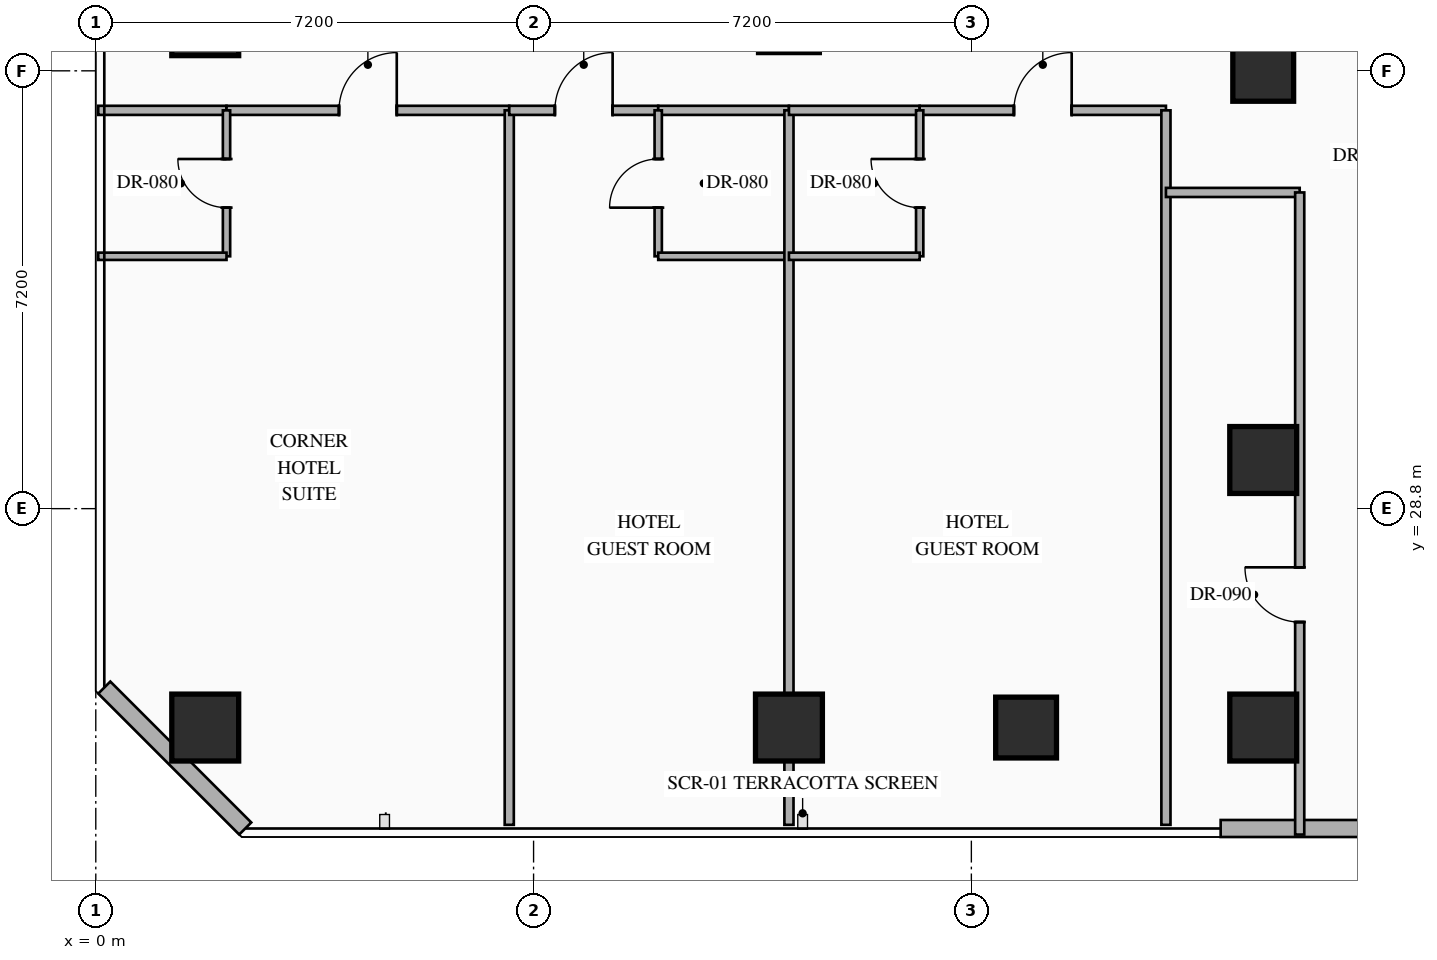
"""IFC4 building model, lengths in metres.
Left out: names, types, materials, properties, quantities, classifications, styles, units other than length and angle.
Written with IfcOpenShell. Run it as: python <this file> out.ifc"""

import sys

from ifc_helpers import new_model, si_unit, direction, frame, frame_2d, origin, origin_2d, place, context, subcontext, project, spatial, rectangle, hollow_rectangle, extrude, element, fill, save


model = new_model("IFC4")
c1 = context("Model", 3, precision=1e-05, world=origin(), true_north=direction((0.0, 1.0)))
c2 = subcontext(c1, "Body", "Model", "MODEL_VIEW")
j1 = project(units=[si_unit("LENGTHUNIT", "METRE"), si_unit("PLANEANGLEUNIT", "RADIAN")], contexts=[c1])
p1 = place(None, origin())
s1 = spatial("IfcSite", under=j1, at=p1, CompositionType="ELEMENT")
p2 = place(p1, origin())
s2 = spatial("IfcBuilding", under=s1, at=p2, CompositionType="ELEMENT")
p3 = place(p2, frame((0.0, 0.0, 46.65)))
s3 = spatial("IfcBuildingStorey", under=s2, at=p3, CompositionType="ELEMENT", Elevation=46.65)
for number, where, z_axis, x_axis in (
    (1, (1.8, 25.2, 0.0), (0.0, 0.0, 1.0), (1.0, 0.0, 0.0)),
    (2, (1.8, 36.8, 0.0), (0.0, 0.0, 1.0), (1.0, 0.0, 0.0)),
    (3, (11.4, 25.2, 0.0), (0.0, 0.0, 1.0), (1.0, 0.0, 0.0)),
    (4, (19.2, 25.2, 0.0), (0.0, 0.0, 1.0), (1.0, 0.0, 0.0)),
    (5, (19.2, 29.6, 0.0), (0.0, 0.0, 1.0), (1.0, 0.0, 0.0)),
):
    element("IfcColumn", number, at=place(p3, frame(where, z_axis=z_axis, x_axis=x_axis)), inside=s3, PredefinedType="COLUMN", context=c2, shape_type="SweptSolid", body=[
        extrude(hollow_rectangle(XDim=1.1, YDim=1.1, WallThickness=0.04, at=origin_2d()), origin(), (0.0, 0.0, 1.0), 3.35),
    ])
for number, where, z_axis, x_axis in (
    (6, (19.2, 36.0, 0.0), (0.0, 0.0, 1.0), (1.0, 0.0, 0.0)),
    (7, (15.3, 25.2, 0.0), (0.0, 0.0, 1.0), (1.0, 0.0, 0.0)),
):
    element("IfcColumn", number, at=place(p3, frame(where, z_axis=z_axis, x_axis=x_axis)), inside=s3, PredefinedType="COLUMN", context=c2, shape_type="SweptSolid", body=[
        extrude(hollow_rectangle(XDim=1.0, YDim=1.0, WallThickness=0.038, at=origin_2d()), origin(), (0.0, 0.0, 1.0), 3.35),
    ])
p4 = place(p3, frame((25.247, 23.54, 0.0), z_axis=(0.0, 0.0, 1.0), x_axis=(-1.0, 0.0, 0.0)))
e8 = element("IfcWall", 8, at=p4, inside=s3, PredefinedType="STANDARD", context=c2, shape_type="SweptSolid", body=[
    extrude(rectangle(XDim=6.747, YDim=0.28, at=frame_2d((3.374, 0.0))), origin(), (0.0, 0.0, 1.0), 3.13),
])
p5 = place(p3, frame((2.458, 23.54, 0.0), z_axis=(0.0, 0.0, 1.0), x_axis=(-0.707144017911, 0.707069542501, 0.0)))
e9 = element("IfcWall", 9, at=p5, inside=s3, PredefinedType="STANDARD", context=c2, shape_type="SweptSolid", body=[
    extrude(rectangle(XDim=3.278, YDim=0.28, at=frame_2d((1.639, 0.0))), origin(), (0.0, 0.0, 1.0), 3.13),
])
p6 = place(p3, frame((0.04, 35.35, 0.0), z_axis=(0.0, 0.0, 1.0), x_axis=(1.0, 0.0, 0.0)))
e10 = element("IfcWall", 10, at=p6, inside=s3, PredefinedType="PARTITIONING", context=c2, shape_type="SweptSolid", body=[
    extrude(rectangle(XDim=2.11, YDim=0.15, at=frame_2d((1.055, 0.0))), origin(), (0.0, 0.0, 1.0), 3.13),
])
p7 = place(p3, frame((2.15, 35.35, 0.0), z_axis=(0.0, 0.0, 1.0), x_axis=(1.0, 0.0, 0.0)))
e11 = element("IfcWall", 11, at=p7, inside=s3, PredefinedType="PARTITIONING", context=c2, shape_type="SweptSolid", body=[
    extrude(rectangle(XDim=4.65, YDim=0.15, at=frame_2d((2.325, 0.0))), origin(), (0.0, 0.0, 1.0), 3.13),
])
p8 = place(p7, frame((1.85, 0.0, 0.0)))
e12 = element("IfcOpeningElement", 12, at=p8, cuts=e11, PredefinedType="OPENING", context=c2, shape_type="SweptSolid", body=[
    extrude(rectangle(XDim=0.95, YDim=2.15, at=frame_2d((0.475, 1.075))), frame((0.0, 0.085, 0.0), z_axis=(0.0, -1.0, 0.0), x_axis=(1.0, 0.0, 0.0)), (0.0, 0.0, 1.0), 0.17),
])
p9 = place(p3, frame((2.15, 32.95, 0.0), z_axis=(0.0, 0.0, 1.0), x_axis=(0.0, 1.0, 0.0)))
e13 = element("IfcWall", 13, at=p9, inside=s3, PredefinedType="PARTITIONING", context=c2, shape_type="SweptSolid", body=[
    extrude(rectangle(XDim=2.4, YDim=0.12, at=frame_2d((1.2, 0.0))), origin(), (0.0, 0.0, 1.0), 3.13),
])
p10 = place(p9, frame((0.8, 0.0, 0.0)))
e14 = element("IfcOpeningElement", 14, at=p10, cuts=e13, PredefinedType="OPENING", context=c2, shape_type="SweptSolid", body=[
    extrude(rectangle(XDim=0.8, YDim=2.06, at=frame_2d((0.4, 1.03))), frame((0.0, 0.07, 0.0), z_axis=(0.0, -1.0, 0.0), x_axis=(1.0, 0.0, 0.0)), (0.0, 0.0, 1.0), 0.14),
])
p11 = place(p3, frame((0.04, 32.95, 0.0), z_axis=(0.0, 0.0, 1.0), x_axis=(1.0, 0.0, 0.0)))
e15 = element("IfcWall", 15, at=p11, inside=s3, PredefinedType="PARTITIONING", context=c2, shape_type="SweptSolid", body=[
    extrude(rectangle(XDim=2.11, YDim=0.12, at=frame_2d((1.055, 0.0))), origin(), (0.0, 0.0, 1.0), 3.13),
])
p12 = place(p3, frame((6.8, 23.6, 0.0), z_axis=(0.0, 0.0, 1.0), x_axis=(0.0, 1.0, 0.0)))
e16 = element("IfcWall", 16, at=p12, inside=s3, PredefinedType="PARTITIONING", context=c2, shape_type="SweptSolid", body=[
    extrude(rectangle(XDim=11.75, YDim=0.15, at=frame_2d((5.875, 0.0))), origin(), (0.0, 0.0, 1.0), 3.13),
])
p13 = place(p3, frame((6.8, 35.35, 0.0), z_axis=(0.0, 0.0, 1.0), x_axis=(1.0, 0.0, 0.0)))
e17 = element("IfcWall", 17, at=p13, inside=s3, PredefinedType="PARTITIONING", context=c2, shape_type="SweptSolid", body=[
    extrude(rectangle(XDim=2.45, YDim=0.15, at=frame_2d((1.225, 0.0))), origin(), (0.0, 0.0, 1.0), 3.13),
])
p14 = place(p13, frame((0.75, 0.0, 0.0)))
e18 = element("IfcOpeningElement", 18, at=p14, cuts=e17, PredefinedType="OPENING", context=c2, shape_type="SweptSolid", body=[
    extrude(rectangle(XDim=0.95, YDim=2.15, at=frame_2d((0.475, 1.075))), frame((0.0, 0.085, 0.0), z_axis=(0.0, -1.0, 0.0), x_axis=(1.0, 0.0, 0.0)), (0.0, 0.0, 1.0), 0.17),
])
p15 = place(p3, frame((9.25, 35.35, 0.0), z_axis=(0.0, 0.0, 1.0), x_axis=(1.0, 0.0, 0.0)))
e19 = element("IfcWall", 19, at=p15, inside=s3, PredefinedType="PARTITIONING", context=c2, shape_type="SweptSolid", body=[
    extrude(rectangle(XDim=2.15, YDim=0.15, at=frame_2d((1.075, 0.0))), origin(), (0.0, 0.0, 1.0), 3.13),
])
p16 = place(p3, frame((9.25, 32.95, 0.0), z_axis=(0.0, 0.0, 1.0), x_axis=(0.0, 1.0, 0.0)))
e20 = element("IfcWall", 20, at=p16, inside=s3, PredefinedType="PARTITIONING", context=c2, shape_type="SweptSolid", body=[
    extrude(rectangle(XDim=2.4, YDim=0.12, at=frame_2d((1.2, 0.0))), origin(), (0.0, 0.0, 1.0), 3.13),
])
p17 = place(p16, frame((0.8, 0.0, 0.0)))
e21 = element("IfcOpeningElement", 21, at=p17, cuts=e20, PredefinedType="OPENING", context=c2, shape_type="SweptSolid", body=[
    extrude(rectangle(XDim=0.8, YDim=2.06, at=frame_2d((0.4, 1.03))), frame((0.0, 0.07, 0.0), z_axis=(0.0, -1.0, 0.0), x_axis=(1.0, 0.0, 0.0)), (0.0, 0.0, 1.0), 0.14),
])
p18 = place(p3, frame((9.25, 32.95, 0.0), z_axis=(0.0, 0.0, 1.0), x_axis=(1.0, 0.0, 0.0)))
e22 = element("IfcWall", 22, at=p18, inside=s3, PredefinedType="PARTITIONING", context=c2, shape_type="SweptSolid", body=[
    extrude(rectangle(XDim=2.15, YDim=0.12, at=frame_2d((1.075, 0.0))), origin(), (0.0, 0.0, 1.0), 3.13),
])
p19 = place(p3, frame((11.4, 23.6, 0.0), z_axis=(0.0, 0.0, 1.0), x_axis=(0.0, 1.0, 0.0)))
e23 = element("IfcWall", 23, at=p19, inside=s3, PredefinedType="PARTITIONING", context=c2, shape_type="SweptSolid", body=[
    extrude(rectangle(XDim=11.75, YDim=0.15, at=frame_2d((5.875, 0.0))), origin(), (0.0, 0.0, 1.0), 2.425),
])
p20 = place(p3, frame((11.4, 35.35, 0.0), z_axis=(0.0, 0.0, 1.0), x_axis=(1.0, 0.0, 0.0)))
e24 = element("IfcWall", 24, at=p20, inside=s3, PredefinedType="PARTITIONING", context=c2, shape_type="SweptSolid", body=[
    extrude(rectangle(XDim=2.15, YDim=0.15, at=frame_2d((1.075, 0.0))), origin(), (0.0, 0.0, 1.0), 3.13),
])
p21 = place(p3, frame((13.55, 35.35, 0.0), z_axis=(0.0, 0.0, 1.0), x_axis=(1.0, 0.0, 0.0)))
e25 = element("IfcWall", 25, at=p21, inside=s3, PredefinedType="PARTITIONING", context=c2, shape_type="SweptSolid", body=[
    extrude(rectangle(XDim=4.05, YDim=0.15, at=frame_2d((2.025, 0.0))), origin(), (0.0, 0.0, 1.0), 3.13),
])
p22 = place(p21, frame((1.55, 0.0, 0.0)))
e26 = element("IfcOpeningElement", 26, at=p22, cuts=e25, PredefinedType="OPENING", context=c2, shape_type="SweptSolid", body=[
    extrude(rectangle(XDim=0.95, YDim=2.15, at=frame_2d((0.475, 1.075))), frame((0.0, 0.085, 0.0), z_axis=(0.0, -1.0, 0.0), x_axis=(1.0, 0.0, 0.0)), (0.0, 0.0, 1.0), 0.17),
])
p23 = place(p3, frame((13.55, 32.95, 0.0), z_axis=(0.0, 0.0, 1.0), x_axis=(0.0, 1.0, 0.0)))
e27 = element("IfcWall", 27, at=p23, inside=s3, PredefinedType="PARTITIONING", context=c2, shape_type="SweptSolid", body=[
    extrude(rectangle(XDim=2.4, YDim=0.12, at=frame_2d((1.2, 0.0))), origin(), (0.0, 0.0, 1.0), 3.13),
])
p24 = place(p23, frame((0.8, 0.0, 0.0)))
e28 = element("IfcOpeningElement", 28, at=p24, cuts=e27, PredefinedType="OPENING", context=c2, shape_type="SweptSolid", body=[
    extrude(rectangle(XDim=0.8, YDim=2.06, at=frame_2d((0.4, 1.03))), frame((0.0, 0.07, 0.0), z_axis=(0.0, -1.0, 0.0), x_axis=(1.0, 0.0, 0.0)), (0.0, 0.0, 1.0), 0.14),
])
p25 = place(p3, frame((11.4, 32.95, 0.0), z_axis=(0.0, 0.0, 1.0), x_axis=(1.0, 0.0, 0.0)))
e29 = element("IfcWall", 29, at=p25, inside=s3, PredefinedType="PARTITIONING", context=c2, shape_type="SweptSolid", body=[
    extrude(rectangle(XDim=2.15, YDim=0.12, at=frame_2d((1.075, 0.0))), origin(), (0.0, 0.0, 1.0), 3.13),
])
p26 = place(p3, frame((17.6, 23.6, 0.0), z_axis=(0.0, 0.0, 1.0), x_axis=(0.0, 1.0, 0.0)))
e30 = element("IfcWall", 30, at=p26, inside=s3, PredefinedType="PARTITIONING", context=c2, shape_type="SweptSolid", body=[
    extrude(rectangle(XDim=11.75, YDim=0.15, at=frame_2d((5.875, 0.0))), origin(), (0.0, 0.0, 1.0), 3.13),
])
p27 = place(p3, frame((17.6, 34.0, 0.0), z_axis=(0.0, 0.0, 1.0), x_axis=(1.0, 0.0, 0.0)))
e31 = element("IfcWall", 31, at=p27, inside=s3, PredefinedType="PARTITIONING", context=c2, shape_type="SweptSolid", body=[
    extrude(rectangle(XDim=2.2, YDim=0.15, at=frame_2d((1.1, 0.0))), origin(), (0.0, 0.0, 1.0), 3.13),
])
p28 = place(p3, frame((19.8, 23.44, 0.0), z_axis=(0.0, 0.0, 1.0), x_axis=(0.0, 1.0, 0.0)))
e32 = element("IfcWall", 32, at=p28, inside=s3, PredefinedType="PARTITIONING", context=c2, shape_type="SweptSolid", body=[
    extrude(rectangle(XDim=10.56, YDim=0.15, at=frame_2d((5.28, 0.0))), origin(), (0.0, 0.0, 1.0), 3.13),
])
p29 = place(p28, frame((3.495, 0.0, 0.0)))
e33 = element("IfcOpeningElement", 33, at=p29, cuts=e32, PredefinedType="OPENING", context=c2, shape_type="SweptSolid", body=[
    extrude(rectangle(XDim=0.9, YDim=2.15, at=frame_2d((0.45, 1.075))), frame((0.0, 0.085, 0.0), z_axis=(0.0, -1.0, 0.0), x_axis=(1.0, 0.0, 0.0)), (0.0, 0.0, 1.0), 0.17),
])
p30 = place(p8, origin())
e34 = element("IfcDoor", 34, at=p30, inside=s3, OperationType="SINGLE_SWING_RIGHT", PredefinedType="DOOR", context=c2, shape_type="SweptSolid", body=[
    extrude(rectangle(XDim=0.95, YDim=2.15, at=frame_2d((0.475, 1.075))), frame((0.0, 0.025, 0.0), z_axis=(0.0, -1.0, 0.0), x_axis=(1.0, 0.0, 0.0)), (0.0, 0.0, 1.0), 0.05),
])
fill(e12, e34)
p31 = place(p10, origin())
e35 = element("IfcDoor", 35, at=p31, inside=s3, OperationType="SINGLE_SWING_RIGHT", PredefinedType="DOOR", context=c2, shape_type="SweptSolid", body=[
    extrude(rectangle(XDim=0.8, YDim=2.06, at=frame_2d((0.4, 1.03))), frame((0.0, 0.025, 0.0), z_axis=(0.0, -1.0, 0.0), x_axis=(1.0, 0.0, 0.0)), (0.0, 0.0, 1.0), 0.05),
])
fill(e14, e35)
p32 = place(p14, origin())
e36 = element("IfcDoor", 36, at=p32, inside=s3, OperationType="SINGLE_SWING_RIGHT", PredefinedType="DOOR", context=c2, shape_type="SweptSolid", body=[
    extrude(rectangle(XDim=0.95, YDim=2.15, at=frame_2d((0.475, 1.075))), frame((0.0, 0.025, 0.0), z_axis=(0.0, -1.0, 0.0), x_axis=(1.0, 0.0, 0.0)), (0.0, 0.0, 1.0), 0.05),
])
fill(e18, e36)
p33 = place(p17, origin())
e37 = element("IfcDoor", 37, at=p33, inside=s3, OperationType="SINGLE_SWING_LEFT", PredefinedType="DOOR", context=c2, shape_type="SweptSolid", body=[
    extrude(rectangle(XDim=0.8, YDim=2.06, at=frame_2d((0.4, 1.03))), frame((0.0, 0.025, 0.0), z_axis=(0.0, -1.0, 0.0), x_axis=(1.0, 0.0, 0.0)), (0.0, 0.0, 1.0), 0.05),
])
fill(e21, e37)
p34 = place(p22, origin())
e38 = element("IfcDoor", 38, at=p34, inside=s3, OperationType="SINGLE_SWING_RIGHT", PredefinedType="DOOR", context=c2, shape_type="SweptSolid", body=[
    extrude(rectangle(XDim=0.95, YDim=2.15, at=frame_2d((0.475, 1.075))), frame((0.0, 0.025, 0.0), z_axis=(0.0, -1.0, 0.0), x_axis=(1.0, 0.0, 0.0)), (0.0, 0.0, 1.0), 0.05),
])
fill(e26, e38)
p35 = place(p24, origin())
e39 = element("IfcDoor", 39, at=p35, inside=s3, OperationType="SINGLE_SWING_RIGHT", PredefinedType="DOOR", context=c2, shape_type="SweptSolid", body=[
    extrude(rectangle(XDim=0.8, YDim=2.06, at=frame_2d((0.4, 1.03))), frame((0.0, 0.025, 0.0), z_axis=(0.0, -1.0, 0.0), x_axis=(1.0, 0.0, 0.0)), (0.0, 0.0, 1.0), 0.05),
])
fill(e28, e39)
p36 = place(p29, origin())
e40 = element("IfcDoor", 40, at=p36, inside=s3, OperationType="SINGLE_SWING_RIGHT", PredefinedType="DOOR", context=c2, shape_type="SweptSolid", body=[
    extrude(rectangle(XDim=0.9, YDim=2.15, at=frame_2d((0.45, 1.075))), frame((0.0, 0.025, 0.0), z_axis=(0.0, -1.0, 0.0), x_axis=(1.0, 0.0, 0.0)), (0.0, 0.0, 1.0), 0.05),
])
fill(e33, e40)
save(model, sys.argv[1])
